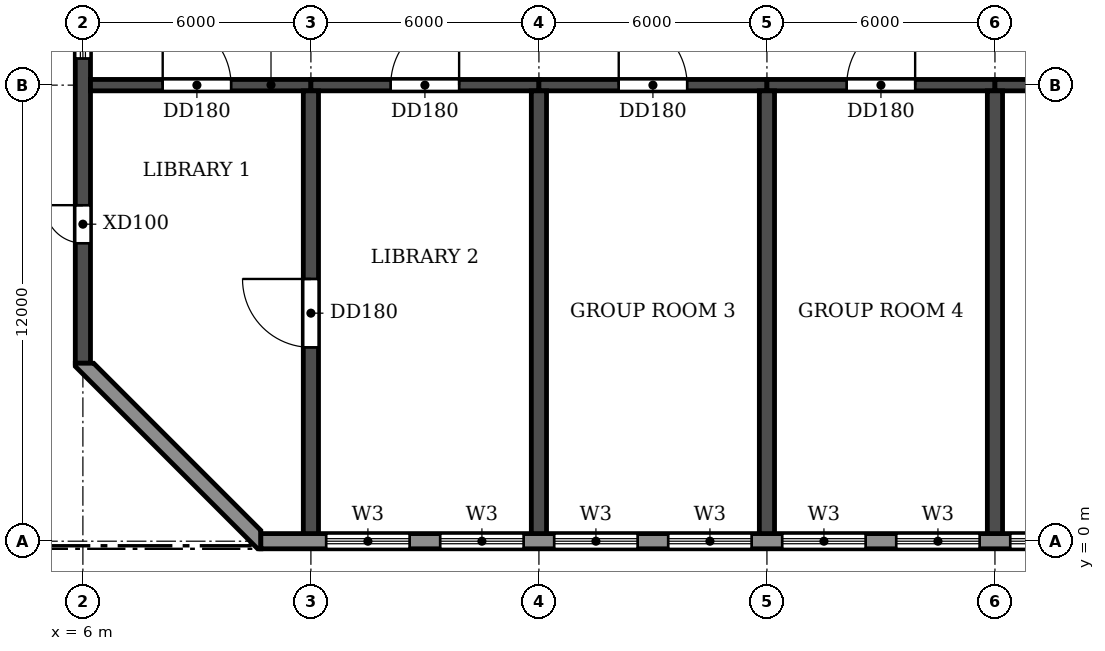
"""IFC4 building model, lengths in metres.
Left out: names, types, materials, properties, quantities, classifications, styles, units other than length and angle.
Written with IfcOpenShell. Run it as: python <this file> out.ifc"""

import sys

from ifc_helpers import new_model, si_unit, direction, frame, frame_2d, origin, place, context, subcontext, project, spatial, polyline, rectangle, outline, extrude, element, fill, save


model = new_model("IFC4")
c1 = context("Model", 3, precision=1e-05, world=origin(), true_north=direction((0.0, 1.0)))
c2 = subcontext(c1, "Body", "Model", "MODEL_VIEW")
j1 = project(units=[si_unit("LENGTHUNIT", "METRE"), si_unit("PLANEANGLEUNIT", "RADIAN")], contexts=[c1])
p1 = place(None, origin())
s1 = spatial("IfcSite", under=j1, at=p1, CompositionType="ELEMENT")
p2 = place(p1, origin())
s2 = spatial("IfcBuilding", under=s1, at=p2, CompositionType="ELEMENT")
p3 = place(p2, frame((0.0, 0.0, 53.1)))
s3 = spatial("IfcBuildingStorey", under=s2, at=p3, CompositionType="ELEMENT", Elevation=53.1)
p4 = place(p3, frame((12.0, 0.2, 0.0), z_axis=(0.0, 0.0, 1.0), x_axis=(0.0, 1.0, 0.0)))
e1 = element("IfcWall", 1, at=p4, inside=s3, PredefinedType="SHEAR", context=c2, shape_type="SweptSolid", body=[
    extrude(rectangle(XDim=11.65, YDim=0.4, at=frame_2d((5.825, 0.0))), origin(), (0.0, 0.0, 1.0), 3.05),
])
p5 = place(p4, frame((4.9, 0.0, 0.0)))
e2 = element("IfcOpeningElement", 2, at=p5, cuts=e1, PredefinedType="OPENING", context=c2, shape_type="SweptSolid", body=[
    extrude(rectangle(XDim=1.8, YDim=2.1, at=frame_2d((0.9, 1.05))), frame((0.0, 0.21, 0.0), z_axis=(0.0, -1.0, 0.0), x_axis=(1.0, 0.0, 0.0)), (0.0, 0.0, 1.0), 0.42),
])
for number, where, z_axis, x_axis in (
    (3, (18.0, 0.2, 0.0), (0.0, 0.0, 1.0), (0.0, 1.0, 0.0)),
    (4, (24.0, 0.2, 0.0), (0.0, 0.0, 1.0), (0.0, 1.0, 0.0)),
    (5, (30.0, 0.2, 0.0), (0.0, 0.0, 1.0), (0.0, 1.0, 0.0)),
):
    element("IfcWall", number, at=place(p3, frame(where, z_axis=z_axis, x_axis=x_axis)), inside=s3, PredefinedType="SHEAR", context=c2, shape_type="SweptSolid", body=[
        extrude(rectangle(XDim=11.65, YDim=0.4, at=frame_2d((5.825, 0.0))), origin(), (0.0, 0.0, 1.0), 3.05),
    ])
p6 = place(p3, frame((6.0, 4.683, 0.0), z_axis=(0.0, 0.0, 1.0), x_axis=(0.0, 1.0, 0.0)))
e6 = element("IfcWall", 6, at=p6, inside=s3, PredefinedType="SHEAR", context=c2, shape_type="SweptSolid", body=[
    extrude(rectangle(XDim=35.434, YDim=0.4, at=frame_2d((17.717, 0.0))), origin(), (0.0, 0.0, 1.0), 3.05),
])
p7 = place(p6, frame((23.817, 0.0, 0.9)))
e7 = element("IfcOpeningElement", 7, at=p7, cuts=e6, PredefinedType="OPENING", context=c2, shape_type="SweptSolid", body=[
    extrude(rectangle(XDim=1.2, YDim=1.5, at=frame_2d((0.6, 0.75))), frame((0.0, 0.21, 0.0), z_axis=(0.0, -1.0, 0.0), x_axis=(1.0, 0.0, 0.0)), (0.0, 0.0, 1.0), 0.42),
])
p8 = place(p6, frame((8.017, 0.0, 0.9)))
e8 = element("IfcOpeningElement", 8, at=p8, cuts=e6, PredefinedType="OPENING", context=c2, shape_type="SweptSolid", body=[
    extrude(rectangle(XDim=1.2, YDim=1.5, at=frame_2d((0.6, 0.75))), frame((0.0, 0.21, 0.0), z_axis=(0.0, -1.0, 0.0), x_axis=(1.0, 0.0, 0.0)), (0.0, 0.0, 1.0), 0.42),
])
p9 = place(p6, frame((15.917, 0.0, 0.9)))
e9 = element("IfcOpeningElement", 9, at=p9, cuts=e6, PredefinedType="OPENING", context=c2, shape_type="SweptSolid", body=[
    extrude(rectangle(XDim=1.2, YDim=1.5, at=frame_2d((0.6, 0.75))), frame((0.0, 0.21, 0.0), z_axis=(0.0, -1.0, 0.0), x_axis=(1.0, 0.0, 0.0)), (0.0, 0.0, 1.0), 0.42),
])
p10 = place(p6, frame((30.076, 0.0, 0.0)))
e10 = element("IfcOpeningElement", 10, at=p10, cuts=e6, PredefinedType="OPENING", context=c2, shape_type="SweptSolid", body=[
    extrude(rectangle(XDim=1.0, YDim=2.1, at=frame_2d((0.5, 1.05))), frame((0.0, 0.21, 0.0), z_axis=(0.0, -1.0, 0.0), x_axis=(1.0, 0.0, 0.0)), (0.0, 0.0, 1.0), 0.42),
])
p11 = place(p6, frame((3.159, 0.0, 0.0)))
e11 = element("IfcOpeningElement", 11, at=p11, cuts=e6, PredefinedType="OPENING", context=c2, shape_type="SweptSolid", body=[
    extrude(rectangle(XDim=1.0, YDim=2.1, at=frame_2d((0.5, 1.05))), frame((0.0, 0.21, 0.0), z_axis=(0.0, -1.0, 0.0), x_axis=(1.0, 0.0, 0.0)), (0.0, 0.0, 1.0), 0.42),
])
p12 = place(p3, frame((6.2, 12.0, 0.0), z_axis=(0.0, 0.0, 1.0), x_axis=(1.0, 0.0, 0.0)))
e12 = element("IfcWall", 12, at=p12, inside=s3, PredefinedType="SHEAR", context=c2, shape_type="SweptSolid", body=[
    extrude(rectangle(XDim=5.8, YDim=0.3, at=frame_2d((2.9, 0.0))), origin(), (0.0, 0.0, 1.0), 2.45),
])
p13 = place(p12, frame((1.9, 0.0, 0.0)))
e13 = element("IfcOpeningElement", 13, at=p13, cuts=e12, PredefinedType="OPENING", context=c2, shape_type="SweptSolid", body=[
    extrude(rectangle(XDim=1.8, YDim=2.1, at=frame_2d((0.9, 1.05))), frame((0.0, 0.16, 0.0), z_axis=(0.0, -1.0, 0.0), x_axis=(1.0, 0.0, 0.0)), (0.0, 0.0, 1.0), 0.32),
])
p14 = place(p3, frame((12.0, 12.0, 0.0), z_axis=(0.0, 0.0, 1.0), x_axis=(1.0, 0.0, 0.0)))
e14 = element("IfcWall", 14, at=p14, inside=s3, PredefinedType="SHEAR", context=c2, shape_type="SweptSolid", body=[
    extrude(rectangle(XDim=6.0, YDim=0.3, at=frame_2d((3.0, 0.0))), origin(), (0.0, 0.0, 1.0), 2.45),
])
p15 = place(p14, frame((2.1, 0.0, 0.0)))
e15 = element("IfcOpeningElement", 15, at=p15, cuts=e14, PredefinedType="OPENING", context=c2, shape_type="SweptSolid", body=[
    extrude(rectangle(XDim=1.8, YDim=2.1, at=frame_2d((0.9, 1.05))), frame((0.0, 0.16, 0.0), z_axis=(0.0, -1.0, 0.0), x_axis=(1.0, 0.0, 0.0)), (0.0, 0.0, 1.0), 0.32),
])
p16 = place(p3, frame((18.0, 12.0, 0.0), z_axis=(0.0, 0.0, 1.0), x_axis=(1.0, 0.0, 0.0)))
e16 = element("IfcWall", 16, at=p16, inside=s3, PredefinedType="SHEAR", context=c2, shape_type="SweptSolid", body=[
    extrude(rectangle(XDim=6.0, YDim=0.3, at=frame_2d((3.0, 0.0))), origin(), (0.0, 0.0, 1.0), 2.45),
])
p17 = place(p16, frame((2.1, 0.0, 0.0)))
e17 = element("IfcOpeningElement", 17, at=p17, cuts=e16, PredefinedType="OPENING", context=c2, shape_type="SweptSolid", body=[
    extrude(rectangle(XDim=1.8, YDim=2.1, at=frame_2d((0.9, 1.05))), frame((0.0, 0.16, 0.0), z_axis=(0.0, -1.0, 0.0), x_axis=(1.0, 0.0, 0.0)), (0.0, 0.0, 1.0), 0.32),
])
p18 = place(p3, frame((24.0, 12.0, 0.0), z_axis=(0.0, 0.0, 1.0), x_axis=(1.0, 0.0, 0.0)))
e18 = element("IfcWall", 18, at=p18, inside=s3, PredefinedType="SHEAR", context=c2, shape_type="SweptSolid", body=[
    extrude(rectangle(XDim=6.0, YDim=0.3, at=frame_2d((3.0, 0.0))), origin(), (0.0, 0.0, 1.0), 2.45),
])
p19 = place(p18, frame((2.1, 0.0, 0.0)))
e19 = element("IfcOpeningElement", 19, at=p19, cuts=e18, PredefinedType="OPENING", context=c2, shape_type="SweptSolid", body=[
    extrude(rectangle(XDim=1.8, YDim=2.1, at=frame_2d((0.9, 1.05))), frame((0.0, 0.16, 0.0), z_axis=(0.0, -1.0, 0.0), x_axis=(1.0, 0.0, 0.0)), (0.0, 0.0, 1.0), 0.32),
])
p20 = place(p3, frame((30.0, 12.0, 0.0), z_axis=(0.0, 0.0, 1.0), x_axis=(1.0, 0.0, 0.0)))
e20 = element("IfcWall", 20, at=p20, inside=s3, PredefinedType="SHEAR", context=c2, shape_type="SweptSolid", body=[
    extrude(rectangle(XDim=6.0, YDim=0.3, at=frame_2d((3.0, 0.0))), origin(), (0.0, 0.0, 1.0), 2.45),
])
p21 = place(p20, frame((2.1, 0.0, 0.0)))
e21 = element("IfcOpeningElement", 21, at=p21, cuts=e20, PredefinedType="OPENING", context=c2, shape_type="SweptSolid", body=[
    extrude(rectangle(XDim=1.8, YDim=2.1, at=frame_2d((0.9, 1.05))), frame((0.0, 0.16, 0.0), z_axis=(0.0, -1.0, 0.0), x_axis=(1.0, 0.0, 0.0)), (0.0, 0.0, 1.0), 0.32),
])
p22 = place(p3, frame((10.683, 0.0, 0.0), z_axis=(0.0, 0.0, 1.0), x_axis=(1.0, 0.0, 0.0)))
e22 = element("IfcWall", 22, at=p22, inside=s3, PredefinedType="STANDARD", context=c2, shape_type="SweptSolid", body=[
    extrude(rectangle(XDim=80.634, YDim=0.4, at=frame_2d((40.317, 0.0))), origin(), (0.0, 0.0, 1.0), 3.05),
])
p23 = place(p22, frame((1.717, 0.0, 0.6)))
e23 = element("IfcOpeningElement", 23, at=p23, cuts=e22, PredefinedType="OPENING", context=c2, shape_type="SweptSolid", body=[
    extrude(rectangle(XDim=2.2, YDim=1.8, at=frame_2d((1.1, 0.9))), frame((0.0, 0.21, 0.0), z_axis=(0.0, -1.0, 0.0), x_axis=(1.0, 0.0, 0.0)), (0.0, 0.0, 1.0), 0.42),
])
p24 = place(p22, frame((4.717, 0.0, 0.6)))
e24 = element("IfcOpeningElement", 24, at=p24, cuts=e22, PredefinedType="OPENING", context=c2, shape_type="SweptSolid", body=[
    extrude(rectangle(XDim=2.2, YDim=1.8, at=frame_2d((1.1, 0.9))), frame((0.0, 0.21, 0.0), z_axis=(0.0, -1.0, 0.0), x_axis=(1.0, 0.0, 0.0)), (0.0, 0.0, 1.0), 0.42),
])
p25 = place(p22, frame((7.717, 0.0, 0.6)))
e25 = element("IfcOpeningElement", 25, at=p25, cuts=e22, PredefinedType="OPENING", context=c2, shape_type="SweptSolid", body=[
    extrude(rectangle(XDim=2.2, YDim=1.8, at=frame_2d((1.1, 0.9))), frame((0.0, 0.21, 0.0), z_axis=(0.0, -1.0, 0.0), x_axis=(1.0, 0.0, 0.0)), (0.0, 0.0, 1.0), 0.42),
])
p26 = place(p22, frame((10.717, 0.0, 0.6)))
e26 = element("IfcOpeningElement", 26, at=p26, cuts=e22, PredefinedType="OPENING", context=c2, shape_type="SweptSolid", body=[
    extrude(rectangle(XDim=2.2, YDim=1.8, at=frame_2d((1.1, 0.9))), frame((0.0, 0.21, 0.0), z_axis=(0.0, -1.0, 0.0), x_axis=(1.0, 0.0, 0.0)), (0.0, 0.0, 1.0), 0.42),
])
p27 = place(p22, frame((13.717, 0.0, 0.6)))
e27 = element("IfcOpeningElement", 27, at=p27, cuts=e22, PredefinedType="OPENING", context=c2, shape_type="SweptSolid", body=[
    extrude(rectangle(XDim=2.2, YDim=1.8, at=frame_2d((1.1, 0.9))), frame((0.0, 0.21, 0.0), z_axis=(0.0, -1.0, 0.0), x_axis=(1.0, 0.0, 0.0)), (0.0, 0.0, 1.0), 0.42),
])
p28 = place(p22, frame((16.717, 0.0, 0.6)))
e28 = element("IfcOpeningElement", 28, at=p28, cuts=e22, PredefinedType="OPENING", context=c2, shape_type="SweptSolid", body=[
    extrude(rectangle(XDim=2.2, YDim=1.8, at=frame_2d((1.1, 0.9))), frame((0.0, 0.21, 0.0), z_axis=(0.0, -1.0, 0.0), x_axis=(1.0, 0.0, 0.0)), (0.0, 0.0, 1.0), 0.42),
])
p29 = place(p22, frame((19.717, 0.0, 0.6)))
e29 = element("IfcOpeningElement", 29, at=p29, cuts=e22, PredefinedType="OPENING", context=c2, shape_type="SweptSolid", body=[
    extrude(rectangle(XDim=2.2, YDim=1.8, at=frame_2d((1.1, 0.9))), frame((0.0, 0.21, 0.0), z_axis=(0.0, -1.0, 0.0), x_axis=(1.0, 0.0, 0.0)), (0.0, 0.0, 1.0), 0.42),
])
p30 = place(p22, frame((22.717, 0.0, 0.6)))
e30 = element("IfcOpeningElement", 30, at=p30, cuts=e22, PredefinedType="OPENING", context=c2, shape_type="SweptSolid", body=[
    extrude(rectangle(XDim=2.2, YDim=1.8, at=frame_2d((1.1, 0.9))), frame((0.0, 0.21, 0.0), z_axis=(0.0, -1.0, 0.0), x_axis=(1.0, 0.0, 0.0)), (0.0, 0.0, 1.0), 0.42),
])
p31 = place(p22, frame((25.717, 0.0, 0.6)))
e31 = element("IfcOpeningElement", 31, at=p31, cuts=e22, PredefinedType="OPENING", context=c2, shape_type="SweptSolid", body=[
    extrude(rectangle(XDim=2.2, YDim=1.8, at=frame_2d((1.1, 0.9))), frame((0.0, 0.21, 0.0), z_axis=(0.0, -1.0, 0.0), x_axis=(1.0, 0.0, 0.0)), (0.0, 0.0, 1.0), 0.42),
])
p32 = place(p22, frame((28.717, 0.0, 0.6)))
e32 = element("IfcOpeningElement", 32, at=p32, cuts=e22, PredefinedType="OPENING", context=c2, shape_type="SweptSolid", body=[
    extrude(rectangle(XDim=2.2, YDim=1.8, at=frame_2d((1.1, 0.9))), frame((0.0, 0.21, 0.0), z_axis=(0.0, -1.0, 0.0), x_axis=(1.0, 0.0, 0.0)), (0.0, 0.0, 1.0), 0.42),
])
p33 = place(p22, frame((31.717, 0.0, 0.6)))
e33 = element("IfcOpeningElement", 33, at=p33, cuts=e22, PredefinedType="OPENING", context=c2, shape_type="SweptSolid", body=[
    extrude(rectangle(XDim=2.2, YDim=1.8, at=frame_2d((1.1, 0.9))), frame((0.0, 0.21, 0.0), z_axis=(0.0, -1.0, 0.0), x_axis=(1.0, 0.0, 0.0)), (0.0, 0.0, 1.0), 0.42),
])
p34 = place(p22, frame((34.717, 0.0, 0.6)))
e34 = element("IfcOpeningElement", 34, at=p34, cuts=e22, PredefinedType="OPENING", context=c2, shape_type="SweptSolid", body=[
    extrude(rectangle(XDim=2.2, YDim=1.8, at=frame_2d((1.1, 0.9))), frame((0.0, 0.21, 0.0), z_axis=(0.0, -1.0, 0.0), x_axis=(1.0, 0.0, 0.0)), (0.0, 0.0, 1.0), 0.42),
])
p35 = place(p22, frame((43.717, 0.0, 0.6)))
e35 = element("IfcOpeningElement", 35, at=p35, cuts=e22, PredefinedType="OPENING", context=c2, shape_type="SweptSolid", body=[
    extrude(rectangle(XDim=2.2, YDim=1.8, at=frame_2d((1.1, 0.9))), frame((0.0, 0.21, 0.0), z_axis=(0.0, -1.0, 0.0), x_axis=(1.0, 0.0, 0.0)), (0.0, 0.0, 1.0), 0.42),
])
p36 = place(p22, frame((46.717, 0.0, 0.6)))
e36 = element("IfcOpeningElement", 36, at=p36, cuts=e22, PredefinedType="OPENING", context=c2, shape_type="SweptSolid", body=[
    extrude(rectangle(XDim=2.2, YDim=1.8, at=frame_2d((1.1, 0.9))), frame((0.0, 0.21, 0.0), z_axis=(0.0, -1.0, 0.0), x_axis=(1.0, 0.0, 0.0)), (0.0, 0.0, 1.0), 0.42),
])
p37 = place(p22, frame((49.717, 0.0, 0.6)))
e37 = element("IfcOpeningElement", 37, at=p37, cuts=e22, PredefinedType="OPENING", context=c2, shape_type="SweptSolid", body=[
    extrude(rectangle(XDim=2.2, YDim=1.8, at=frame_2d((1.1, 0.9))), frame((0.0, 0.21, 0.0), z_axis=(0.0, -1.0, 0.0), x_axis=(1.0, 0.0, 0.0)), (0.0, 0.0, 1.0), 0.42),
])
p38 = place(p22, frame((52.717, 0.0, 0.6)))
e38 = element("IfcOpeningElement", 38, at=p38, cuts=e22, PredefinedType="OPENING", context=c2, shape_type="SweptSolid", body=[
    extrude(rectangle(XDim=2.2, YDim=1.8, at=frame_2d((1.1, 0.9))), frame((0.0, 0.21, 0.0), z_axis=(0.0, -1.0, 0.0), x_axis=(1.0, 0.0, 0.0)), (0.0, 0.0, 1.0), 0.42),
])
p39 = place(p22, frame((61.717, 0.0, 0.6)))
e39 = element("IfcOpeningElement", 39, at=p39, cuts=e22, PredefinedType="OPENING", context=c2, shape_type="SweptSolid", body=[
    extrude(rectangle(XDim=2.2, YDim=1.8, at=frame_2d((1.1, 0.9))), frame((0.0, 0.21, 0.0), z_axis=(0.0, -1.0, 0.0), x_axis=(1.0, 0.0, 0.0)), (0.0, 0.0, 1.0), 0.42),
])
p40 = place(p22, frame((64.717, 0.0, 0.6)))
e40 = element("IfcOpeningElement", 40, at=p40, cuts=e22, PredefinedType="OPENING", context=c2, shape_type="SweptSolid", body=[
    extrude(rectangle(XDim=2.2, YDim=1.8, at=frame_2d((1.1, 0.9))), frame((0.0, 0.21, 0.0), z_axis=(0.0, -1.0, 0.0), x_axis=(1.0, 0.0, 0.0)), (0.0, 0.0, 1.0), 0.42),
])
p41 = place(p22, frame((67.717, 0.0, 0.6)))
e41 = element("IfcOpeningElement", 41, at=p41, cuts=e22, PredefinedType="OPENING", context=c2, shape_type="SweptSolid", body=[
    extrude(rectangle(XDim=2.2, YDim=1.8, at=frame_2d((1.1, 0.9))), frame((0.0, 0.21, 0.0), z_axis=(0.0, -1.0, 0.0), x_axis=(1.0, 0.0, 0.0)), (0.0, 0.0, 1.0), 0.42),
])
p42 = place(p22, frame((70.717, 0.0, 0.6)))
e42 = element("IfcOpeningElement", 42, at=p42, cuts=e22, PredefinedType="OPENING", context=c2, shape_type="SweptSolid", body=[
    extrude(rectangle(XDim=2.2, YDim=1.8, at=frame_2d((1.1, 0.9))), frame((0.0, 0.21, 0.0), z_axis=(0.0, -1.0, 0.0), x_axis=(1.0, 0.0, 0.0)), (0.0, 0.0, 1.0), 0.42),
])
p43 = place(p22, frame((73.717, 0.0, 0.6)))
e43 = element("IfcOpeningElement", 43, at=p43, cuts=e22, PredefinedType="OPENING", context=c2, shape_type="SweptSolid", body=[
    extrude(rectangle(XDim=2.2, YDim=1.8, at=frame_2d((1.1, 0.9))), frame((0.0, 0.21, 0.0), z_axis=(0.0, -1.0, 0.0), x_axis=(1.0, 0.0, 0.0)), (0.0, 0.0, 1.0), 0.42),
])
p44 = place(p22, frame((76.717, 0.0, 0.6)))
e44 = element("IfcOpeningElement", 44, at=p44, cuts=e22, PredefinedType="OPENING", context=c2, shape_type="SweptSolid", body=[
    extrude(rectangle(XDim=2.2, YDim=1.8, at=frame_2d((1.1, 0.9))), frame((0.0, 0.21, 0.0), z_axis=(0.0, -1.0, 0.0), x_axis=(1.0, 0.0, 0.0)), (0.0, 0.0, 1.0), 0.42),
])
p45 = place(p3, origin())
e45 = element("IfcWall", 45, at=p45, inside=s3, PredefinedType="STANDARD", context=c2, shape_type="SweptSolid", body=[
    extrude(outline(polyline([(5.8, 4.683), (5.8, 4.6), (10.6, -0.2), (10.683, -0.2), (10.683, 0.283), (6.283, 4.683), (5.8, 4.683)])), origin(), (0.0, 0.0, 1.0), 3.05),
])
p46 = place(p23, origin())
e46 = element("IfcWindow", 46, at=p46, inside=s3, PartitioningType="DOUBLE_PANEL_HORIZONTAL", PredefinedType="WINDOW", context=c2, shape_type="SweptSolid", body=[
    extrude(rectangle(XDim=2.2, YDim=1.8, at=frame_2d((1.1, 0.9))), frame((0.0, 0.03, 0.0), z_axis=(0.0, -1.0, 0.0), x_axis=(1.0, 0.0, 0.0)), (0.0, 0.0, 1.0), 0.06),
])
fill(e23, e46)
p47 = place(p24, origin())
e47 = element("IfcWindow", 47, at=p47, inside=s3, PartitioningType="DOUBLE_PANEL_HORIZONTAL", PredefinedType="WINDOW", context=c2, shape_type="SweptSolid", body=[
    extrude(rectangle(XDim=2.2, YDim=1.8, at=frame_2d((1.1, 0.9))), frame((0.0, 0.03, 0.0), z_axis=(0.0, -1.0, 0.0), x_axis=(1.0, 0.0, 0.0)), (0.0, 0.0, 1.0), 0.06),
])
fill(e24, e47)
p48 = place(p25, origin())
e48 = element("IfcWindow", 48, at=p48, inside=s3, PartitioningType="DOUBLE_PANEL_HORIZONTAL", PredefinedType="WINDOW", context=c2, shape_type="SweptSolid", body=[
    extrude(rectangle(XDim=2.2, YDim=1.8, at=frame_2d((1.1, 0.9))), frame((0.0, 0.03, 0.0), z_axis=(0.0, -1.0, 0.0), x_axis=(1.0, 0.0, 0.0)), (0.0, 0.0, 1.0), 0.06),
])
fill(e25, e48)
p49 = place(p26, origin())
e49 = element("IfcWindow", 49, at=p49, inside=s3, PartitioningType="DOUBLE_PANEL_HORIZONTAL", PredefinedType="WINDOW", context=c2, shape_type="SweptSolid", body=[
    extrude(rectangle(XDim=2.2, YDim=1.8, at=frame_2d((1.1, 0.9))), frame((0.0, 0.03, 0.0), z_axis=(0.0, -1.0, 0.0), x_axis=(1.0, 0.0, 0.0)), (0.0, 0.0, 1.0), 0.06),
])
fill(e26, e49)
p50 = place(p27, origin())
e50 = element("IfcWindow", 50, at=p50, inside=s3, PartitioningType="DOUBLE_PANEL_HORIZONTAL", PredefinedType="WINDOW", context=c2, shape_type="SweptSolid", body=[
    extrude(rectangle(XDim=2.2, YDim=1.8, at=frame_2d((1.1, 0.9))), frame((0.0, 0.03, 0.0), z_axis=(0.0, -1.0, 0.0), x_axis=(1.0, 0.0, 0.0)), (0.0, 0.0, 1.0), 0.06),
])
fill(e27, e50)
p51 = place(p28, origin())
e51 = element("IfcWindow", 51, at=p51, inside=s3, PartitioningType="DOUBLE_PANEL_HORIZONTAL", PredefinedType="WINDOW", context=c2, shape_type="SweptSolid", body=[
    extrude(rectangle(XDim=2.2, YDim=1.8, at=frame_2d((1.1, 0.9))), frame((0.0, 0.03, 0.0), z_axis=(0.0, -1.0, 0.0), x_axis=(1.0, 0.0, 0.0)), (0.0, 0.0, 1.0), 0.06),
])
fill(e28, e51)
p52 = place(p29, origin())
e52 = element("IfcWindow", 52, at=p52, inside=s3, PartitioningType="DOUBLE_PANEL_HORIZONTAL", PredefinedType="WINDOW", context=c2, shape_type="SweptSolid", body=[
    extrude(rectangle(XDim=2.2, YDim=1.8, at=frame_2d((1.1, 0.9))), frame((0.0, 0.03, 0.0), z_axis=(0.0, -1.0, 0.0), x_axis=(1.0, 0.0, 0.0)), (0.0, 0.0, 1.0), 0.06),
])
fill(e29, e52)
p53 = place(p8, origin())
e53 = element("IfcWindow", 53, at=p53, inside=s3, PartitioningType="SINGLE_PANEL", PredefinedType="WINDOW", context=c2, shape_type="SweptSolid", body=[
    extrude(rectangle(XDim=1.2, YDim=1.5, at=frame_2d((0.6, 0.75))), frame((0.0, 0.03, 0.0), z_axis=(0.0, -1.0, 0.0), x_axis=(1.0, 0.0, 0.0)), (0.0, 0.0, 1.0), 0.06),
])
fill(e8, e53)
p54 = place(p13, origin())
e54 = element("IfcDoor", 54, at=p54, inside=s3, OperationType="DOUBLE_DOOR_SINGLE_SWING", PredefinedType="DOOR", context=c2, shape_type="SweptSolid", body=[
    extrude(rectangle(XDim=1.8, YDim=2.1, at=frame_2d((0.9, 1.05))), frame((0.0, 0.025, 0.0), z_axis=(0.0, -1.0, 0.0), x_axis=(1.0, 0.0, 0.0)), (0.0, 0.0, 1.0), 0.05),
])
fill(e13, e54)
p55 = place(p15, origin())
e55 = element("IfcDoor", 55, at=p55, inside=s3, OperationType="DOUBLE_DOOR_SINGLE_SWING", PredefinedType="DOOR", context=c2, shape_type="SweptSolid", body=[
    extrude(rectangle(XDim=1.8, YDim=2.1, at=frame_2d((0.9, 1.05))), frame((0.0, 0.025, 0.0), z_axis=(0.0, -1.0, 0.0), x_axis=(1.0, 0.0, 0.0)), (0.0, 0.0, 1.0), 0.05),
])
fill(e15, e55)
p56 = place(p17, origin())
e56 = element("IfcDoor", 56, at=p56, inside=s3, OperationType="DOUBLE_DOOR_SINGLE_SWING", PredefinedType="DOOR", context=c2, shape_type="SweptSolid", body=[
    extrude(rectangle(XDim=1.8, YDim=2.1, at=frame_2d((0.9, 1.05))), frame((0.0, 0.025, 0.0), z_axis=(0.0, -1.0, 0.0), x_axis=(1.0, 0.0, 0.0)), (0.0, 0.0, 1.0), 0.05),
])
fill(e17, e56)
p57 = place(p19, origin())
e57 = element("IfcDoor", 57, at=p57, inside=s3, OperationType="DOUBLE_DOOR_SINGLE_SWING", PredefinedType="DOOR", context=c2, shape_type="SweptSolid", body=[
    extrude(rectangle(XDim=1.8, YDim=2.1, at=frame_2d((0.9, 1.05))), frame((0.0, 0.025, 0.0), z_axis=(0.0, -1.0, 0.0), x_axis=(1.0, 0.0, 0.0)), (0.0, 0.0, 1.0), 0.05),
])
fill(e19, e57)
p58 = place(p11, origin())
e58 = element("IfcDoor", 58, at=p58, inside=s3, OperationType="SINGLE_SWING_RIGHT", PredefinedType="DOOR", context=c2, shape_type="SweptSolid", body=[
    extrude(rectangle(XDim=1.0, YDim=2.1, at=frame_2d((0.5, 1.05))), frame((0.0, 0.025, 0.0), z_axis=(0.0, -1.0, 0.0), x_axis=(1.0, 0.0, 0.0)), (0.0, 0.0, 1.0), 0.05),
])
fill(e11, e58)
p59 = place(p5, origin())
e59 = element("IfcDoor", 59, at=p59, inside=s3, OperationType="DOUBLE_DOOR_SINGLE_SWING", PredefinedType="DOOR", context=c2, shape_type="SweptSolid", body=[
    extrude(rectangle(XDim=1.8, YDim=2.1, at=frame_2d((0.9, 1.05))), frame((0.0, 0.025, 0.0), z_axis=(0.0, -1.0, 0.0), x_axis=(1.0, 0.0, 0.0)), (0.0, 0.0, 1.0), 0.05),
])
fill(e2, e59)
save(model, sys.argv[1])
